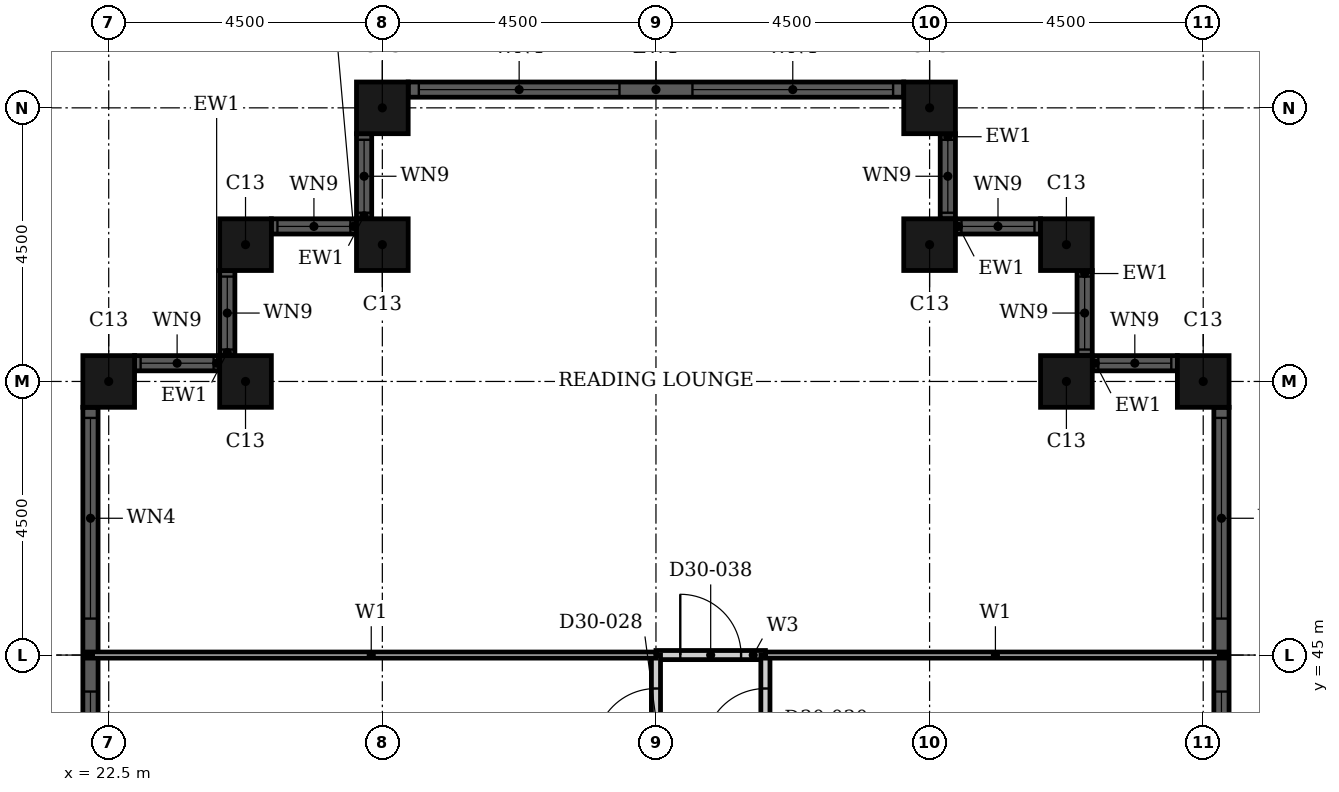
"""IFC4 building model, lengths in metres.
Left out: names, types, materials, properties, quantities, classifications, styles, units other than length and angle.
Written with IfcOpenShell. Run it as: python <this file> out.ifc"""

import sys

from ifc_helpers import new_model, si_unit, direction, frame, frame_2d, origin, origin_2d, place, context, subcontext, project, spatial, rectangle, hollow_rectangle, extrude, element, fill, save


model = new_model("IFC4")
c1 = context("Model", 3, precision=1e-05, world=origin(), true_north=direction((0.0, 1.0)))
c2 = subcontext(c1, "Body", "Model", "MODEL_VIEW")
j1 = project(units=[si_unit("LENGTHUNIT", "METRE"), si_unit("PLANEANGLEUNIT", "RADIAN")], contexts=[c1])
p1 = place(None, origin())
s1 = spatial("IfcSite", under=j1, at=p1, CompositionType="ELEMENT")
p2 = place(p1, origin())
s2 = spatial("IfcBuilding", under=s1, at=p2, CompositionType="ELEMENT")
p3 = place(p2, frame((0.0, 0.0, 122.4)))
s3 = spatial("IfcBuildingStorey", under=s2, at=p3, CompositionType="ELEMENT", Elevation=122.4)
for number, where, z_axis, x_axis in (
    (1, (40.5, 49.5, 0.0), (0.0, 0.0, 1.0), (1.0, 0.0, 0.0)),
    (2, (38.25, 49.5, 0.0), (0.0, 0.0, 1.0), (1.0, 0.0, 0.0)),
    (3, (38.25, 51.75, 0.0), (0.0, 0.0, 1.0), (1.0, 0.0, 0.0)),
    (4, (36.0, 51.75, 0.0), (0.0, 0.0, 1.0), (1.0, 0.0, 0.0)),
    (5, (36.0, 54.0, 0.0), (0.0, 0.0, 1.0), (1.0, 0.0, 0.0)),
    (6, (27.0, 54.0, 0.0), (0.0, 0.0, 1.0), (1.0, 0.0, 0.0)),
    (7, (27.0, 51.75, 0.0), (0.0, 0.0, 1.0), (1.0, 0.0, 0.0)),
    (8, (24.75, 51.75, 0.0), (0.0, 0.0, 1.0), (1.0, 0.0, 0.0)),
    (9, (24.75, 49.5, 0.0), (0.0, 0.0, 1.0), (1.0, 0.0, 0.0)),
    (10, (22.5, 49.5, 0.0), (0.0, 0.0, 1.0), (1.0, 0.0, 0.0)),
):
    element("IfcColumn", number, at=place(p3, frame(where, z_axis=z_axis, x_axis=x_axis)), inside=s3, PredefinedType="COLUMN", context=c2, shape_type="SweptSolid", body=[
        extrude(hollow_rectangle(XDim=0.85, YDim=0.85, WallThickness=0.026, at=origin_2d()), origin(), (0.0, 0.0, 1.0), 3.6),
    ])
p4 = place(p3, frame((40.8, 40.925, 0.0), z_axis=(0.0, 0.0, 1.0), x_axis=(0.0, 1.0, 0.0)))
e11 = element("IfcWall", 11, at=p4, inside=s3, PredefinedType="SOLIDWALL", context=c2, shape_type="SweptSolid", body=[
    extrude(rectangle(XDim=8.15, YDim=0.25, at=frame_2d((4.075, 0.0))), origin(), (0.0, 0.0, 1.0), 3.6),
])
p5 = place(p4, frame((0.175, 0.0, 0.9)))
e12 = element("IfcOpeningElement", 12, at=p5, cuts=e11, PredefinedType="OPENING", context=c2, shape_type="SweptSolid", body=[
    extrude(rectangle(XDim=3.3, YDim=2.08, at=frame_2d((1.65, 1.04))), frame((0.0, 0.135, 0.0), z_axis=(0.0, -1.0, 0.0), x_axis=(1.0, 0.0, 0.0)), (0.0, 0.0, 1.0), 0.27),
])
p6 = place(p4, frame((4.675, 0.0, 0.9)))
e13 = element("IfcOpeningElement", 13, at=p6, cuts=e11, PredefinedType="OPENING", context=c2, shape_type="SweptSolid", body=[
    extrude(rectangle(XDim=3.3, YDim=2.08, at=frame_2d((1.65, 1.04))), frame((0.0, 0.135, 0.0), z_axis=(0.0, -1.0, 0.0), x_axis=(1.0, 0.0, 0.0)), (0.0, 0.0, 1.0), 0.27),
])
p7 = place(p3, frame((40.075, 49.8, 0.0), z_axis=(0.0, 0.0, 1.0), x_axis=(-1.0, 0.0, 0.0)))
e14 = element("IfcWall", 14, at=p7, inside=s3, PredefinedType="SOLIDWALL", context=c2, shape_type="SweptSolid", body=[
    extrude(rectangle(XDim=1.4, YDim=0.25, at=frame_2d((0.7, 0.0))), origin(), (0.0, 0.0, 1.0), 3.6),
])
p8 = place(p7, frame((0.1, 0.0, 0.9)))
e15 = element("IfcOpeningElement", 15, at=p8, cuts=e14, PredefinedType="OPENING", context=c2, shape_type="SweptSolid", body=[
    extrude(rectangle(XDim=1.2, YDim=2.08, at=frame_2d((0.6, 1.04))), frame((0.0, 0.135, 0.0), z_axis=(0.0, -1.0, 0.0), x_axis=(1.0, 0.0, 0.0)), (0.0, 0.0, 1.0), 0.27),
])
p9 = place(p3, frame((38.55, 49.925, 0.0), z_axis=(0.0, 0.0, 1.0), x_axis=(0.0, 1.0, 0.0)))
e16 = element("IfcWall", 16, at=p9, inside=s3, PredefinedType="SOLIDWALL", context=c2, shape_type="SweptSolid", body=[
    extrude(rectangle(XDim=1.4, YDim=0.25, at=frame_2d((0.7, 0.0))), origin(), (0.0, 0.0, 1.0), 3.6),
])
p10 = place(p9, frame((0.1, 0.0, 0.9)))
e17 = element("IfcOpeningElement", 17, at=p10, cuts=e16, PredefinedType="OPENING", context=c2, shape_type="SweptSolid", body=[
    extrude(rectangle(XDim=1.2, YDim=2.08, at=frame_2d((0.6, 1.04))), frame((0.0, 0.135, 0.0), z_axis=(0.0, -1.0, 0.0), x_axis=(1.0, 0.0, 0.0)), (0.0, 0.0, 1.0), 0.27),
])
p11 = place(p3, frame((37.825, 52.05, 0.0), z_axis=(0.0, 0.0, 1.0), x_axis=(-1.0, 0.0, 0.0)))
e18 = element("IfcWall", 18, at=p11, inside=s3, PredefinedType="SOLIDWALL", context=c2, shape_type="SweptSolid", body=[
    extrude(rectangle(XDim=1.4, YDim=0.25, at=frame_2d((0.7, 0.0))), origin(), (0.0, 0.0, 1.0), 3.6),
])
p12 = place(p11, frame((0.1, 0.0, 0.9)))
e19 = element("IfcOpeningElement", 19, at=p12, cuts=e18, PredefinedType="OPENING", context=c2, shape_type="SweptSolid", body=[
    extrude(rectangle(XDim=1.2, YDim=2.08, at=frame_2d((0.6, 1.04))), frame((0.0, 0.135, 0.0), z_axis=(0.0, -1.0, 0.0), x_axis=(1.0, 0.0, 0.0)), (0.0, 0.0, 1.0), 0.27),
])
p13 = place(p3, frame((36.3, 52.175, 0.0), z_axis=(0.0, 0.0, 1.0), x_axis=(0.0, 1.0, 0.0)))
e20 = element("IfcWall", 20, at=p13, inside=s3, PredefinedType="SOLIDWALL", context=c2, shape_type="SweptSolid", body=[
    extrude(rectangle(XDim=1.4, YDim=0.25, at=frame_2d((0.7, 0.0))), origin(), (0.0, 0.0, 1.0), 3.6),
])
p14 = place(p13, frame((0.1, 0.0, 0.9)))
e21 = element("IfcOpeningElement", 21, at=p14, cuts=e20, PredefinedType="OPENING", context=c2, shape_type="SweptSolid", body=[
    extrude(rectangle(XDim=1.2, YDim=2.08, at=frame_2d((0.6, 1.04))), frame((0.0, 0.135, 0.0), z_axis=(0.0, -1.0, 0.0), x_axis=(1.0, 0.0, 0.0)), (0.0, 0.0, 1.0), 0.27),
])
p15 = place(p3, frame((35.575, 54.3, 0.0), z_axis=(0.0, 0.0, 1.0), x_axis=(-1.0, 0.0, 0.0)))
e22 = element("IfcWall", 22, at=p15, inside=s3, PredefinedType="SOLIDWALL", context=c2, shape_type="SweptSolid", body=[
    extrude(rectangle(XDim=8.15, YDim=0.25, at=frame_2d((4.075, 0.0))), origin(), (0.0, 0.0, 1.0), 3.6),
])
p16 = place(p15, frame((0.175, 0.0, 0.9)))
e23 = element("IfcOpeningElement", 23, at=p16, cuts=e22, PredefinedType="OPENING", context=c2, shape_type="SweptSolid", body=[
    extrude(rectangle(XDim=3.3, YDim=2.08, at=frame_2d((1.65, 1.04))), frame((0.0, 0.135, 0.0), z_axis=(0.0, -1.0, 0.0), x_axis=(1.0, 0.0, 0.0)), (0.0, 0.0, 1.0), 0.27),
])
p17 = place(p15, frame((4.675, 0.0, 0.9)))
e24 = element("IfcOpeningElement", 24, at=p17, cuts=e22, PredefinedType="OPENING", context=c2, shape_type="SweptSolid", body=[
    extrude(rectangle(XDim=3.3, YDim=2.08, at=frame_2d((1.65, 1.04))), frame((0.0, 0.135, 0.0), z_axis=(0.0, -1.0, 0.0), x_axis=(1.0, 0.0, 0.0)), (0.0, 0.0, 1.0), 0.27),
])
p18 = place(p3, frame((26.7, 53.575, 0.0), z_axis=(0.0, 0.0, 1.0), x_axis=(0.0, -1.0, 0.0)))
e25 = element("IfcWall", 25, at=p18, inside=s3, PredefinedType="SOLIDWALL", context=c2, shape_type="SweptSolid", body=[
    extrude(rectangle(XDim=1.4, YDim=0.25, at=frame_2d((0.7, 0.0))), origin(), (0.0, 0.0, 1.0), 3.6),
])
p19 = place(p18, frame((0.1, 0.0, 0.9)))
e26 = element("IfcOpeningElement", 26, at=p19, cuts=e25, PredefinedType="OPENING", context=c2, shape_type="SweptSolid", body=[
    extrude(rectangle(XDim=1.2, YDim=2.08, at=frame_2d((0.6, 1.04))), frame((0.0, 0.135, 0.0), z_axis=(0.0, -1.0, 0.0), x_axis=(1.0, 0.0, 0.0)), (0.0, 0.0, 1.0), 0.27),
])
p20 = place(p3, frame((26.575, 52.05, 0.0), z_axis=(0.0, 0.0, 1.0), x_axis=(-1.0, 0.0, 0.0)))
e27 = element("IfcWall", 27, at=p20, inside=s3, PredefinedType="SOLIDWALL", context=c2, shape_type="SweptSolid", body=[
    extrude(rectangle(XDim=1.4, YDim=0.25, at=frame_2d((0.7, 0.0))), origin(), (0.0, 0.0, 1.0), 3.6),
])
p21 = place(p20, frame((0.1, 0.0, 0.9)))
e28 = element("IfcOpeningElement", 28, at=p21, cuts=e27, PredefinedType="OPENING", context=c2, shape_type="SweptSolid", body=[
    extrude(rectangle(XDim=1.2, YDim=2.08, at=frame_2d((0.6, 1.04))), frame((0.0, 0.135, 0.0), z_axis=(0.0, -1.0, 0.0), x_axis=(1.0, 0.0, 0.0)), (0.0, 0.0, 1.0), 0.27),
])
p22 = place(p3, frame((24.45, 51.325, 0.0), z_axis=(0.0, 0.0, 1.0), x_axis=(0.0, -1.0, 0.0)))
e29 = element("IfcWall", 29, at=p22, inside=s3, PredefinedType="SOLIDWALL", context=c2, shape_type="SweptSolid", body=[
    extrude(rectangle(XDim=1.4, YDim=0.25, at=frame_2d((0.7, 0.0))), origin(), (0.0, 0.0, 1.0), 3.6),
])
p23 = place(p22, frame((0.1, 0.0, 0.9)))
e30 = element("IfcOpeningElement", 30, at=p23, cuts=e29, PredefinedType="OPENING", context=c2, shape_type="SweptSolid", body=[
    extrude(rectangle(XDim=1.2, YDim=2.08, at=frame_2d((0.6, 1.04))), frame((0.0, 0.135, 0.0), z_axis=(0.0, -1.0, 0.0), x_axis=(1.0, 0.0, 0.0)), (0.0, 0.0, 1.0), 0.27),
])
p24 = place(p3, frame((24.325, 49.8, 0.0), z_axis=(0.0, 0.0, 1.0), x_axis=(-1.0, 0.0, 0.0)))
e31 = element("IfcWall", 31, at=p24, inside=s3, PredefinedType="SOLIDWALL", context=c2, shape_type="SweptSolid", body=[
    extrude(rectangle(XDim=1.4, YDim=0.25, at=frame_2d((0.7, 0.0))), origin(), (0.0, 0.0, 1.0), 3.6),
])
p25 = place(p24, frame((0.1, 0.0, 0.9)))
e32 = element("IfcOpeningElement", 32, at=p25, cuts=e31, PredefinedType="OPENING", context=c2, shape_type="SweptSolid", body=[
    extrude(rectangle(XDim=1.2, YDim=2.08, at=frame_2d((0.6, 1.04))), frame((0.0, 0.135, 0.0), z_axis=(0.0, -1.0, 0.0), x_axis=(1.0, 0.0, 0.0)), (0.0, 0.0, 1.0), 0.27),
])
p26 = place(p3, frame((22.2, 49.075, 0.0), z_axis=(0.0, 0.0, 1.0), x_axis=(0.0, -1.0, 0.0)))
e33 = element("IfcWall", 33, at=p26, inside=s3, PredefinedType="SOLIDWALL", context=c2, shape_type="SweptSolid", body=[
    extrude(rectangle(XDim=8.15, YDim=0.25, at=frame_2d((4.075, 0.0))), origin(), (0.0, 0.0, 1.0), 3.6),
])
p27 = place(p26, frame((0.175, 0.0, 0.9)))
e34 = element("IfcOpeningElement", 34, at=p27, cuts=e33, PredefinedType="OPENING", context=c2, shape_type="SweptSolid", body=[
    extrude(rectangle(XDim=3.3, YDim=2.08, at=frame_2d((1.65, 1.04))), frame((0.0, 0.135, 0.0), z_axis=(0.0, -1.0, 0.0), x_axis=(1.0, 0.0, 0.0)), (0.0, 0.0, 1.0), 0.27),
])
p28 = place(p26, frame((4.675, 0.0, 0.9)))
e35 = element("IfcOpeningElement", 35, at=p28, cuts=e33, PredefinedType="OPENING", context=c2, shape_type="SweptSolid", body=[
    extrude(rectangle(XDim=3.3, YDim=2.08, at=frame_2d((1.65, 1.04))), frame((0.0, 0.135, 0.0), z_axis=(0.0, -1.0, 0.0), x_axis=(1.0, 0.0, 0.0)), (0.0, 0.0, 1.0), 0.27),
])
p29 = place(p3, frame((31.5, 45.0, 0.0), z_axis=(0.0, 0.0, 1.0), x_axis=(1.0, 0.0, 0.0)))
e36 = element("IfcWall", 36, at=p29, inside=s3, PredefinedType="PARTITIONING", context=c2, shape_type="SweptSolid", body=[
    extrude(rectangle(XDim=1.8, YDim=0.15, at=frame_2d((0.9, 0.0))), origin(), (0.0, 0.0, 1.0), 3.3),
])
p30 = place(p29, frame((0.4, 0.0, 0.0)))
e37 = element("IfcOpeningElement", 37, at=p30, cuts=e36, PredefinedType="OPENING", context=c2, shape_type="SweptSolid", body=[
    extrude(rectangle(XDim=1.0, YDim=2.1, at=frame_2d((0.5, 1.05))), frame((0.0, 0.085, 0.0), z_axis=(0.0, -1.0, 0.0), x_axis=(1.0, 0.0, 0.0)), (0.0, 0.0, 1.0), 0.17),
])
p31 = place(p3, frame((31.5, 33.3, 0.0), z_axis=(0.0, 0.0, 1.0), x_axis=(0.0, 1.0, 0.0)))
e38 = element("IfcWall", 38, at=p31, inside=s3, PredefinedType="PARTITIONING", context=c2, shape_type="SweptSolid", body=[
    extrude(rectangle(XDim=11.7, YDim=0.15, at=frame_2d((5.85, 0.0))), origin(), (0.0, 0.0, 1.0), 2.58),
])
p32 = place(p31, frame((10.15, 0.0, 0.0)))
e39 = element("IfcOpeningElement", 39, at=p32, cuts=e38, PredefinedType="OPENING", context=c2, shape_type="SweptSolid", body=[
    extrude(rectangle(XDim=1.0, YDim=2.1, at=frame_2d((0.5, 1.05))), frame((0.0, 0.085, 0.0), z_axis=(0.0, -1.0, 0.0), x_axis=(1.0, 0.0, 0.0)), (0.0, 0.0, 1.0), 0.17),
])
p33 = place(p3, frame((33.3, 33.3, 0.0), z_axis=(0.0, 0.0, 1.0), x_axis=(0.0, 1.0, 0.0)))
e40 = element("IfcWall", 40, at=p33, inside=s3, PredefinedType="PARTITIONING", context=c2, shape_type="SweptSolid", body=[
    extrude(rectangle(XDim=11.7, YDim=0.15, at=frame_2d((5.85, 0.0))), origin(), (0.0, 0.0, 1.0), 3.3),
])
p34 = place(p33, frame((10.15, 0.0, 0.0)))
e41 = element("IfcOpeningElement", 41, at=p34, cuts=e40, PredefinedType="OPENING", context=c2, shape_type="SweptSolid", body=[
    extrude(rectangle(XDim=1.0, YDim=2.1, at=frame_2d((0.5, 1.05))), frame((0.0, 0.085, 0.0), z_axis=(0.0, -1.0, 0.0), x_axis=(1.0, 0.0, 0.0)), (0.0, 0.0, 1.0), 0.17),
])
p35 = place(p3, frame((33.3, 45.0, 0.0), z_axis=(0.0, 0.0, 1.0), x_axis=(1.0, 0.0, 0.0)))
e42 = element("IfcWall", 42, at=p35, inside=s3, PredefinedType="PARTITIONING", context=c2, shape_type="SweptSolid", body=[
    extrude(rectangle(XDim=7.565, YDim=0.1, at=frame_2d((3.782, 0.0))), origin(), (0.0, 0.0, 1.0), 3.3),
])
p36 = place(p3, frame((22.135, 45.0, 0.0), z_axis=(0.0, 0.0, 1.0), x_axis=(1.0, 0.0, 0.0)))
e43 = element("IfcWall", 43, at=p36, inside=s3, PredefinedType="PARTITIONING", context=c2, shape_type="SweptSolid", body=[
    extrude(rectangle(XDim=9.365, YDim=0.1, at=frame_2d((4.683, 0.0))), origin(), (0.0, 0.0, 1.0), 3.3),
])
p37 = place(p5, origin())
e44 = element("IfcWindow", 44, at=p37, inside=s3, PartitioningType="SINGLE_PANEL", PredefinedType="WINDOW", context=c2, shape_type="SweptSolid", body=[
    extrude(rectangle(XDim=3.3, YDim=2.08, at=frame_2d((1.65, 1.04))), frame((0.0, 0.03, 0.0), z_axis=(0.0, -1.0, 0.0), x_axis=(1.0, 0.0, 0.0)), (0.0, 0.0, 1.0), 0.06),
])
fill(e12, e44)
p38 = place(p6, origin())
e45 = element("IfcWindow", 45, at=p38, inside=s3, PartitioningType="SINGLE_PANEL", PredefinedType="WINDOW", context=c2, shape_type="SweptSolid", body=[
    extrude(rectangle(XDim=3.3, YDim=2.08, at=frame_2d((1.65, 1.04))), frame((0.0, 0.03, 0.0), z_axis=(0.0, -1.0, 0.0), x_axis=(1.0, 0.0, 0.0)), (0.0, 0.0, 1.0), 0.06),
])
fill(e13, e45)
p39 = place(p8, origin())
e46 = element("IfcWindow", 46, at=p39, inside=s3, PartitioningType="SINGLE_PANEL", PredefinedType="WINDOW", context=c2, shape_type="SweptSolid", body=[
    extrude(rectangle(XDim=1.2, YDim=2.08, at=frame_2d((0.6, 1.04))), frame((0.0, 0.03, 0.0), z_axis=(0.0, -1.0, 0.0), x_axis=(1.0, 0.0, 0.0)), (0.0, 0.0, 1.0), 0.06),
])
fill(e15, e46)
p40 = place(p10, origin())
e47 = element("IfcWindow", 47, at=p40, inside=s3, PartitioningType="SINGLE_PANEL", PredefinedType="WINDOW", context=c2, shape_type="SweptSolid", body=[
    extrude(rectangle(XDim=1.2, YDim=2.08, at=frame_2d((0.6, 1.04))), frame((0.0, 0.03, 0.0), z_axis=(0.0, -1.0, 0.0), x_axis=(1.0, 0.0, 0.0)), (0.0, 0.0, 1.0), 0.06),
])
fill(e17, e47)
p41 = place(p12, origin())
e48 = element("IfcWindow", 48, at=p41, inside=s3, PartitioningType="SINGLE_PANEL", PredefinedType="WINDOW", context=c2, shape_type="SweptSolid", body=[
    extrude(rectangle(XDim=1.2, YDim=2.08, at=frame_2d((0.6, 1.04))), frame((0.0, 0.03, 0.0), z_axis=(0.0, -1.0, 0.0), x_axis=(1.0, 0.0, 0.0)), (0.0, 0.0, 1.0), 0.06),
])
fill(e19, e48)
p42 = place(p14, origin())
e49 = element("IfcWindow", 49, at=p42, inside=s3, PartitioningType="SINGLE_PANEL", PredefinedType="WINDOW", context=c2, shape_type="SweptSolid", body=[
    extrude(rectangle(XDim=1.2, YDim=2.08, at=frame_2d((0.6, 1.04))), frame((0.0, 0.03, 0.0), z_axis=(0.0, -1.0, 0.0), x_axis=(1.0, 0.0, 0.0)), (0.0, 0.0, 1.0), 0.06),
])
fill(e21, e49)
p43 = place(p16, origin())
e50 = element("IfcWindow", 50, at=p43, inside=s3, PartitioningType="SINGLE_PANEL", PredefinedType="WINDOW", context=c2, shape_type="SweptSolid", body=[
    extrude(rectangle(XDim=3.3, YDim=2.08, at=frame_2d((1.65, 1.04))), frame((0.0, 0.03, 0.0), z_axis=(0.0, -1.0, 0.0), x_axis=(1.0, 0.0, 0.0)), (0.0, 0.0, 1.0), 0.06),
])
fill(e23, e50)
p44 = place(p17, origin())
e51 = element("IfcWindow", 51, at=p44, inside=s3, PartitioningType="SINGLE_PANEL", PredefinedType="WINDOW", context=c2, shape_type="SweptSolid", body=[
    extrude(rectangle(XDim=3.3, YDim=2.08, at=frame_2d((1.65, 1.04))), frame((0.0, 0.03, 0.0), z_axis=(0.0, -1.0, 0.0), x_axis=(1.0, 0.0, 0.0)), (0.0, 0.0, 1.0), 0.06),
])
fill(e24, e51)
p45 = place(p19, origin())
e52 = element("IfcWindow", 52, at=p45, inside=s3, PartitioningType="SINGLE_PANEL", PredefinedType="WINDOW", context=c2, shape_type="SweptSolid", body=[
    extrude(rectangle(XDim=1.2, YDim=2.08, at=frame_2d((0.6, 1.04))), frame((0.0, 0.03, 0.0), z_axis=(0.0, -1.0, 0.0), x_axis=(1.0, 0.0, 0.0)), (0.0, 0.0, 1.0), 0.06),
])
fill(e26, e52)
p46 = place(p21, origin())
e53 = element("IfcWindow", 53, at=p46, inside=s3, PartitioningType="SINGLE_PANEL", PredefinedType="WINDOW", context=c2, shape_type="SweptSolid", body=[
    extrude(rectangle(XDim=1.2, YDim=2.08, at=frame_2d((0.6, 1.04))), frame((0.0, 0.03, 0.0), z_axis=(0.0, -1.0, 0.0), x_axis=(1.0, 0.0, 0.0)), (0.0, 0.0, 1.0), 0.06),
])
fill(e28, e53)
p47 = place(p23, origin())
e54 = element("IfcWindow", 54, at=p47, inside=s3, PartitioningType="SINGLE_PANEL", PredefinedType="WINDOW", context=c2, shape_type="SweptSolid", body=[
    extrude(rectangle(XDim=1.2, YDim=2.08, at=frame_2d((0.6, 1.04))), frame((0.0, 0.03, 0.0), z_axis=(0.0, -1.0, 0.0), x_axis=(1.0, 0.0, 0.0)), (0.0, 0.0, 1.0), 0.06),
])
fill(e30, e54)
p48 = place(p25, origin())
e55 = element("IfcWindow", 55, at=p48, inside=s3, PartitioningType="SINGLE_PANEL", PredefinedType="WINDOW", context=c2, shape_type="SweptSolid", body=[
    extrude(rectangle(XDim=1.2, YDim=2.08, at=frame_2d((0.6, 1.04))), frame((0.0, 0.03, 0.0), z_axis=(0.0, -1.0, 0.0), x_axis=(1.0, 0.0, 0.0)), (0.0, 0.0, 1.0), 0.06),
])
fill(e32, e55)
p49 = place(p27, origin())
e56 = element("IfcWindow", 56, at=p49, inside=s3, PartitioningType="SINGLE_PANEL", PredefinedType="WINDOW", context=c2, shape_type="SweptSolid", body=[
    extrude(rectangle(XDim=3.3, YDim=2.08, at=frame_2d((1.65, 1.04))), frame((0.0, 0.03, 0.0), z_axis=(0.0, -1.0, 0.0), x_axis=(1.0, 0.0, 0.0)), (0.0, 0.0, 1.0), 0.06),
])
fill(e34, e56)
p50 = place(p28, origin())
e57 = element("IfcWindow", 57, at=p50, inside=s3, PartitioningType="SINGLE_PANEL", PredefinedType="WINDOW", context=c2, shape_type="SweptSolid", body=[
    extrude(rectangle(XDim=3.3, YDim=2.08, at=frame_2d((1.65, 1.04))), frame((0.0, 0.03, 0.0), z_axis=(0.0, -1.0, 0.0), x_axis=(1.0, 0.0, 0.0)), (0.0, 0.0, 1.0), 0.06),
])
fill(e35, e57)
p51 = place(p32, origin())
e58 = element("IfcDoor", 58, at=p51, inside=s3, OperationType="SINGLE_SWING_RIGHT", PredefinedType="DOOR", context=c2, shape_type="SweptSolid", body=[
    extrude(rectangle(XDim=1.0, YDim=2.1, at=frame_2d((0.5, 1.05))), frame((0.0, 0.025, 0.0), z_axis=(0.0, -1.0, 0.0), x_axis=(1.0, 0.0, 0.0)), (0.0, 0.0, 1.0), 0.05),
])
fill(e39, e58)
p52 = place(p34, origin())
e59 = element("IfcDoor", 59, at=p52, inside=s3, OperationType="SINGLE_SWING_RIGHT", PredefinedType="DOOR", context=c2, shape_type="SweptSolid", body=[
    extrude(rectangle(XDim=1.0, YDim=2.1, at=frame_2d((0.5, 1.05))), frame((0.0, 0.025, 0.0), z_axis=(0.0, -1.0, 0.0), x_axis=(1.0, 0.0, 0.0)), (0.0, 0.0, 1.0), 0.05),
])
fill(e41, e59)
p53 = place(p30, origin())
e60 = element("IfcDoor", 60, at=p53, inside=s3, OperationType="SINGLE_SWING_LEFT", PredefinedType="DOOR", context=c2, shape_type="SweptSolid", body=[
    extrude(rectangle(XDim=1.0, YDim=2.1, at=frame_2d((0.5, 1.05))), frame((0.0, 0.025, 0.0), z_axis=(0.0, -1.0, 0.0), x_axis=(1.0, 0.0, 0.0)), (0.0, 0.0, 1.0), 0.05),
])
fill(e37, e60)
save(model, sys.argv[1])
